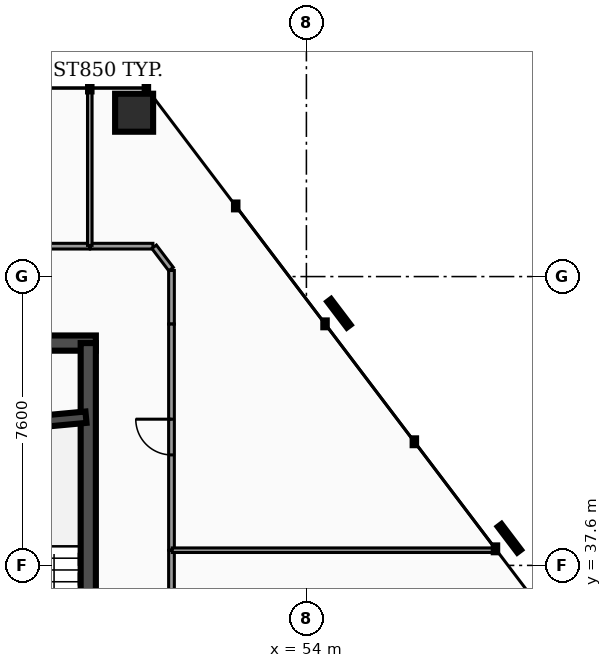
"""IFC4 building model, lengths in metres.
Left out: names, types, materials, properties, quantities, classifications, styles, units other than length and angle.
Written with IfcOpenShell. Run it as: python <this file> out.ifc"""

import sys

from ifc_helpers import new_model, si_unit, direction, frame, frame_2d, origin, origin_2d, place, context, subcontext, project, spatial, rectangle, hollow_rectangle, extrude, element, fill, save


model = new_model("IFC4")
c1 = context("Model", 3, precision=1e-05, world=origin(), true_north=direction((0.0, 1.0)))
c2 = subcontext(c1, "Body", "Model", "MODEL_VIEW")
j1 = project(units=[si_unit("LENGTHUNIT", "METRE"), si_unit("PLANEANGLEUNIT", "RADIAN")], contexts=[c1])
p1 = place(None, origin())
s1 = spatial("IfcSite", under=j1, at=p1, CompositionType="ELEMENT")
p2 = place(p1, origin())
s2 = spatial("IfcBuilding", under=s1, at=p2, CompositionType="ELEMENT")
p3 = place(p2, frame((0.0, 0.0, 31.62)))
s3 = spatial("IfcBuildingStorey", under=s2, at=p3, CompositionType="ELEMENT", Elevation=31.62)
p4 = place(p3, frame((28.4, 43.45, 0.0), z_axis=(0.0, 0.0, 1.0), x_axis=(1.0, 0.0, 0.0)))
e1 = element("IfcWall", 1, at=p4, inside=s3, PredefinedType="SHEAR", context=c2, shape_type="SweptSolid", body=[
    extrude(rectangle(XDim=20.06, YDim=0.4, at=frame_2d((10.03, 0.0))), origin(), (0.0, 0.0, 1.0), 3.82),
])
p5 = place(p3, frame((48.26, 33.25, 0.0), z_axis=(0.0, 0.0, 1.0), x_axis=(0.0, 1.0, 0.0)))
e2 = element("IfcWall", 2, at=p5, inside=s3, PredefinedType="SHEAR", context=c2, shape_type="SweptSolid", body=[
    extrude(rectangle(XDim=10.2, YDim=0.4, at=frame_2d((5.1, 0.0))), origin(), (0.0, 0.0, 1.0), 3.82),
])
p6 = place(p3, frame((44.98, 41.2, 0.0), z_axis=(0.0, 0.0, 1.0), x_axis=(0.995686468965, 0.09278176286, 0.0)))
e3 = element("IfcWall", 3, at=p6, inside=s3, PredefinedType="SHEAR", context=c2, shape_type="SweptSolid", body=[
    extrude(rectangle(XDim=3.234, YDim=0.3, at=frame_2d((1.617, 0.0))), origin(), (0.0, 0.0, 1.0), 3.82),
])
p7 = place(p3, frame((49.466, 49.511, 0.0), z_axis=(0.0, 0.0, 1.0), x_axis=(1.0, 0.0, 0.0)))
e4 = element("IfcColumn", 4, at=p7, inside=s3, PredefinedType="COLUMN", context=c2, shape_type="SweptSolid", body=[
    extrude(hollow_rectangle(XDim=1.0, YDim=1.0, WallThickness=0.05, at=origin_2d()), origin(), (0.0, 0.0, 1.0), 3.82),
])
p8 = place(p3, frame((50.45, 30.17, 0.0), z_axis=(0.0, 0.0, 1.0), x_axis=(0.0, 1.0, 0.0)))
e5 = element("IfcWall", 5, at=p8, inside=s3, PredefinedType="PARTITIONING", context=c2, shape_type="SweptSolid", body=[
    extrude(rectangle(XDim=7.825, YDim=0.15, at=frame_2d((3.913, 0.0))), origin(), (0.0, 0.0, 1.0), 2.777),
])
p9 = place(p8, frame((3.442, 0.0, 0.0)))
e6 = element("IfcOpeningElement", 6, at=p9, cuts=e5, PredefinedType="OPENING", context=c2, shape_type="SweptSolid", body=[
    extrude(rectangle(XDim=0.94, YDim=2.05, at=frame_2d((0.47, 1.025))), frame((0.0, 0.085, 0.0), z_axis=(0.0, -1.0, 0.0), x_axis=(1.0, 0.0, 0.0)), (0.0, 0.0, 1.0), 0.17),
])
p10 = place(p3, frame((48.315, 46.0, 0.0), z_axis=(0.0, 0.0, 1.0), x_axis=(1.0, 0.0, 0.0)))
e7 = element("IfcWall", 7, at=p10, inside=s3, PredefinedType="PARTITIONING", context=c2, shape_type="SweptSolid", body=[
    extrude(rectangle(XDim=1.646, YDim=0.15, at=frame_2d((0.823, 0.0))), origin(), (0.0, 0.0, 1.0), 2.777),
])
p11 = place(p3, frame((49.993, 45.984, 0.0), z_axis=(0.0, 0.0, 1.0), x_axis=(0.603704571474, -0.797208122375, 0.0)))
e8 = element("IfcWall", 8, at=p11, inside=s3, PredefinedType="PARTITIONING", context=c2, shape_type="SweptSolid", body=[
    extrude(rectangle(XDim=0.737, YDim=0.15, at=frame_2d((0.368, 0.0))), origin(), (0.0, 0.0, 1.0), 2.777),
])
p12 = place(p3, frame((50.45, 43.95, 0.0), z_axis=(0.0, 0.0, 1.0), x_axis=(0.0, 1.0, 0.0)))
e9 = element("IfcWall", 9, at=p12, inside=s3, PredefinedType="PARTITIONING", context=c2, shape_type="SweptSolid", body=[
    extrude(rectangle(XDim=1.411, YDim=0.15, at=frame_2d((0.706, 0.0))), origin(), (0.0, 0.0, 1.0), 2.777),
])
p13 = place(p3, frame((50.45, 38.005, 0.0), z_axis=(0.0, 0.0, 1.0), x_axis=(0.0, 1.0, 0.0)))
e10 = element("IfcWall", 10, at=p13, inside=s3, PredefinedType="PARTITIONING", context=c2, shape_type="SweptSolid", body=[
    extrude(rectangle(XDim=5.945, YDim=0.15, at=frame_2d((2.973, 0.0))), origin(), (0.0, 0.0, 1.0), 2.777),
])
p14 = place(p13, frame((2.502, 0.0, 0.0)))
e11 = element("IfcOpeningElement", 11, at=p14, cuts=e10, PredefinedType="OPENING", context=c2, shape_type="SweptSolid", body=[
    extrude(rectangle(XDim=0.94, YDim=2.05, at=frame_2d((0.47, 1.025))), frame((0.0, 0.085, 0.0), z_axis=(0.0, -1.0, 0.0), x_axis=(1.0, 0.0, 0.0)), (0.0, 0.0, 1.0), 0.17),
])
p15 = place(p3, frame((42.605, 46.0, 0.0), z_axis=(0.0, 0.0, 1.0), x_axis=(1.0, 0.0, 0.0)))
e12 = element("IfcWall", 12, at=p15, inside=s3, PredefinedType="PARTITIONING", context=c2, shape_type="SweptSolid", body=[
    extrude(rectangle(XDim=5.69, YDim=0.15, at=frame_2d((2.845, 0.0))), origin(), (0.0, 0.0, 1.0), 2.777),
])
p16 = place(p15, frame((2.375, 0.0, 0.0)))
e13 = element("IfcOpeningElement", 13, at=p16, cuts=e12, PredefinedType="OPENING", context=c2, shape_type="SweptSolid", body=[
    extrude(rectangle(XDim=0.94, YDim=2.05, at=frame_2d((0.47, 1.025))), frame((0.0, 0.085, 0.0), z_axis=(0.0, -1.0, 0.0), x_axis=(1.0, 0.0, 0.0)), (0.0, 0.0, 1.0), 0.17),
])
p17 = place(p3, frame((50.47, 38.0, 0.0), z_axis=(0.0, 0.0, 1.0), x_axis=(1.0, 0.0, 0.0)))
e14 = element("IfcWall", 14, at=p17, inside=s3, PredefinedType="PARTITIONING", context=c2, shape_type="SweptSolid", body=[
    extrude(rectangle(XDim=8.517, YDim=0.12, at=frame_2d((4.259, 0.0))), origin(), (0.0, 0.0, 1.0), 2.777),
])
p18 = place(p3, frame((48.3, 46.02, 0.0), z_axis=(0.0, 0.0, 1.0), x_axis=(0.0, 1.0, 0.0)))
e15 = element("IfcWall", 15, at=p18, inside=s3, PredefinedType="PARTITIONING", context=c2, shape_type="SweptSolid", body=[
    extrude(rectangle(XDim=4.126, YDim=0.12, at=frame_2d((2.063, 0.0))), origin(), (0.0, 0.0, 1.0), 2.777),
])
p19 = place(p14, origin())
e16 = element("IfcDoor", 16, at=p19, inside=s3, OperationType="SINGLE_SWING_RIGHT", PredefinedType="DOOR", context=c2, shape_type="SweptSolid", body=[
    extrude(rectangle(XDim=0.94, YDim=2.05, at=frame_2d((0.47, 1.025))), frame((0.0, 0.025, 0.0), z_axis=(0.0, -1.0, 0.0), x_axis=(1.0, 0.0, 0.0)), (0.0, 0.0, 1.0), 0.05),
])
fill(e11, e16)
save(model, sys.argv[1])
